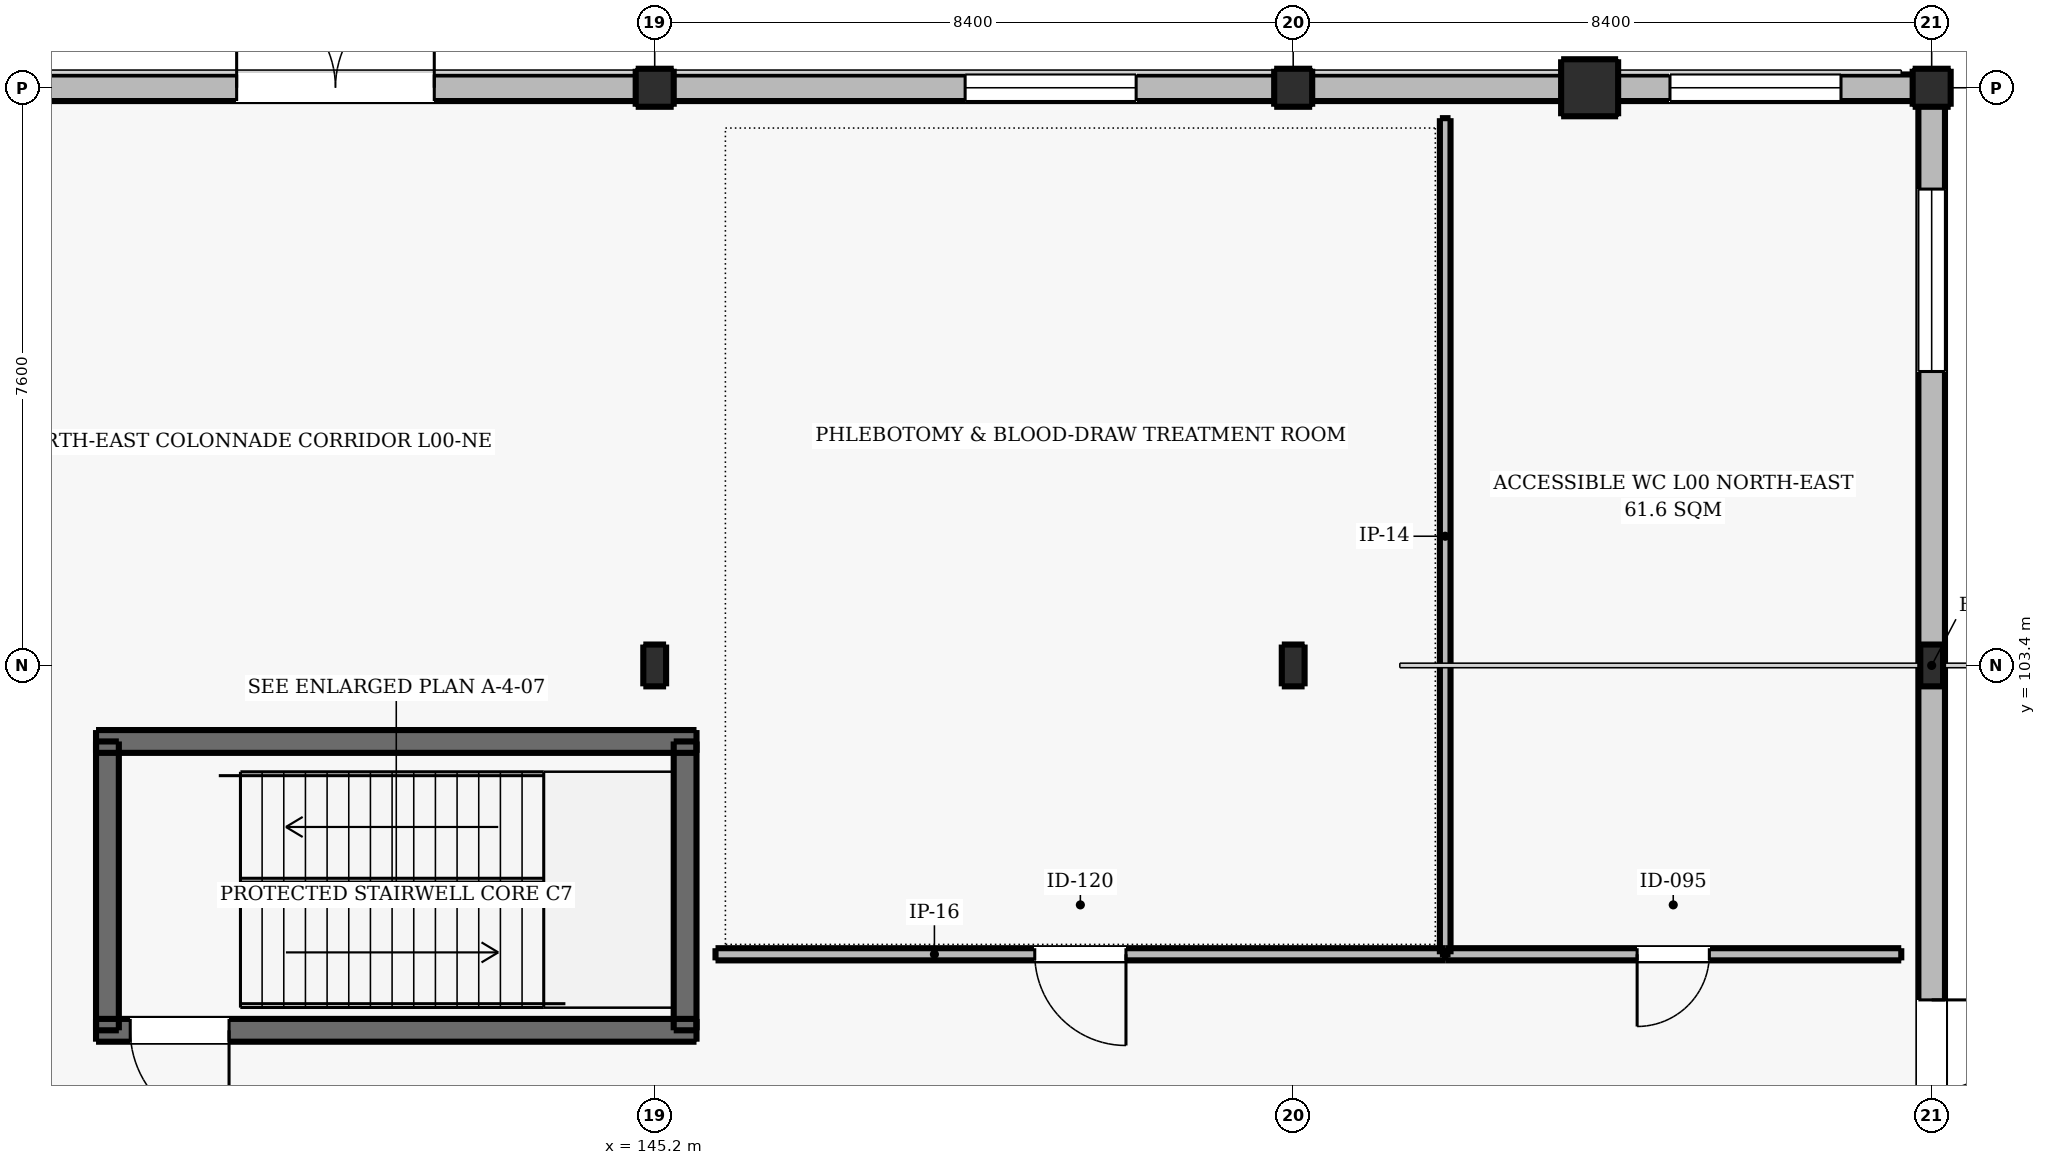
"""IFC4 building model, lengths in metres.
Left out: names, types, materials, properties, quantities, classifications, styles, units other than length and angle.
Written with IfcOpenShell. Run it as: python <this file> out.ifc"""

import sys

from ifc_helpers import new_model, si_unit, direction, frame, frame_2d, origin, origin_2d, place, context, subcontext, project, spatial, rectangle, circle, i_section, extrude, element, fill, save


model = new_model("IFC4")
c1 = context("Model", 3, precision=1e-05, world=origin(), true_north=direction((0.0, 1.0)))
c2 = subcontext(c1, "Body", "Model", "MODEL_VIEW")
j1 = project(units=[si_unit("LENGTHUNIT", "METRE"), si_unit("PLANEANGLEUNIT", "RADIAN")], contexts=[c1])
p1 = place(None, origin())
s1 = spatial("IfcSite", under=j1, at=p1, CompositionType="ELEMENT")
p2 = place(p1, origin())
s2 = spatial("IfcBuilding", under=s1, at=p2, CompositionType="ELEMENT")
p3 = place(p2, origin())
s3 = spatial("IfcBuildingStorey", under=s2, at=p3, CompositionType="ELEMENT", Elevation=0.0)
p4 = place(p3, frame((145.2, 103.4, 0.0), z_axis=(0.0, 0.0, 1.0), x_axis=(1.0, 0.0, 0.0)))
e1 = element("IfcColumn", 1, at=p4, inside=s3, PredefinedType="COLUMN", context=c2, shape_type="SweptSolid", body=[
    extrude(i_section(OverallWidth=0.3, OverallDepth=0.55, WebThickness=0.015, FlangeThickness=0.029, FilletRadius=0.027, at=origin_2d()), origin(), (0.0, 0.0, 1.0), 5.1),
])
p5 = place(p3, frame((145.2, 111.0, 0.0), z_axis=(0.0, 0.0, 1.0), x_axis=(1.0, 0.0, 0.0)))
e2 = element("IfcColumn", 2, at=p5, inside=s3, PredefinedType="COLUMN", context=c2, shape_type="SweptSolid", body=[
    extrude(circle(Radius=0.35, at=origin_2d()), origin(), (0.0, 0.0, 1.0), 5.1),
])
p6 = place(p3, frame((153.6, 103.4, 0.0), z_axis=(0.0, 0.0, 1.0), x_axis=(1.0, 0.0, 0.0)))
e3 = element("IfcColumn", 3, at=p6, inside=s3, PredefinedType="COLUMN", context=c2, shape_type="SweptSolid", body=[
    extrude(i_section(OverallWidth=0.3, OverallDepth=0.55, WebThickness=0.015, FlangeThickness=0.029, FilletRadius=0.027, at=origin_2d()), origin(), (0.0, 0.0, 1.0), 5.1),
])
p7 = place(p3, frame((153.6, 111.0, 0.0), z_axis=(0.0, 0.0, 1.0), x_axis=(1.0, 0.0, 0.0)))
e4 = element("IfcColumn", 4, at=p7, inside=s3, PredefinedType="COLUMN", context=c2, shape_type="SweptSolid", body=[
    extrude(circle(Radius=0.35, at=origin_2d()), origin(), (0.0, 0.0, 1.0), 5.1),
])
p8 = place(p3, frame((157.5, 111.0, 0.0), z_axis=(0.0, 0.0, 1.0), x_axis=(1.0, 0.0, 0.0)))
e5 = element("IfcColumn", 5, at=p8, inside=s3, PredefinedType="PILASTER", context=c2, shape_type="SweptSolid", body=[
    extrude(rectangle(XDim=0.75, YDim=0.75, at=origin_2d()), origin(), (0.0, 0.0, 1.0), 5.1),
])
p9 = place(p3, frame((162.0, 103.4, 0.0), z_axis=(0.0, 0.0, 1.0), x_axis=(1.0, 0.0, 0.0)))
e6 = element("IfcColumn", 6, at=p9, inside=s3, PredefinedType="COLUMN", context=c2, shape_type="SweptSolid", body=[
    extrude(i_section(OverallWidth=0.3, OverallDepth=0.55, WebThickness=0.015, FlangeThickness=0.029, FilletRadius=0.027, at=origin_2d()), origin(), (0.0, 0.0, 1.0), 5.1),
])
p10 = place(p3, frame((162.0, 111.0, 0.0), z_axis=(0.0, 0.0, 1.0), x_axis=(1.0, 0.0, 0.0)))
e7 = element("IfcColumn", 7, at=p10, inside=s3, PredefinedType="COLUMN", context=c2, shape_type="SweptSolid", body=[
    extrude(circle(Radius=0.35, at=origin_2d()), origin(), (0.0, 0.0, 1.0), 5.1),
])
p11 = place(p3, frame((137.85, 98.6, 0.0), z_axis=(0.0, 0.0, 1.0), x_axis=(1.0, 0.0, 0.0)))
e8 = element("IfcWall", 8, at=p11, inside=s3, PredefinedType="SHEAR", context=c2, shape_type="SweptSolid", body=[
    extrude(rectangle(XDim=7.9, YDim=0.3, at=frame_2d((3.95, 0.0))), origin(), (0.0, 0.0, 1.0), 5.1),
])
p12 = place(p11, frame((0.45, 0.0, 0.0)))
e9 = element("IfcOpeningElement", 9, at=p12, cuts=e8, PredefinedType="OPENING", context=c2, shape_type="SweptSolid", body=[
    extrude(rectangle(XDim=1.3, YDim=2.15, at=frame_2d((0.65, 1.075))), frame((0.0, 0.16, 0.0), z_axis=(0.0, -1.0, 0.0), x_axis=(1.0, 0.0, 0.0)), (0.0, 0.0, 1.0), 0.32),
])
p13 = place(p3, frame((137.85, 102.4, 0.0), z_axis=(0.0, 0.0, 1.0), x_axis=(1.0, 0.0, 0.0)))
e10 = element("IfcWall", 10, at=p13, inside=s3, PredefinedType="SHEAR", context=c2, shape_type="SweptSolid", body=[
    extrude(rectangle(XDim=7.9, YDim=0.3, at=frame_2d((3.95, 0.0))), origin(), (0.0, 0.0, 1.0), 5.1),
])
for number, where, z_axis, x_axis in (
    (11, (138.0, 98.6, 0.0), (0.0, 0.0, 1.0), (0.0, 1.0, 0.0)),
    (12, (145.6, 98.6, 0.0), (0.0, 0.0, 1.0), (0.0, 1.0, 0.0)),
):
    element("IfcWall", number, at=place(p3, frame(where, z_axis=z_axis, x_axis=x_axis)), inside=s3, PredefinedType="SHEAR", context=c2, shape_type="SweptSolid", body=[
        extrude(rectangle(XDim=3.8, YDim=0.3, at=frame_2d((1.9, 0.0))), origin(), (0.0, 0.0, 1.0), 5.1),
    ])
p14 = place(p3, frame((111.0, 111.0, 0.0), z_axis=(0.0, 0.0, 1.0), x_axis=(1.0, 0.0, 0.0)))
e13 = element("IfcWall", 13, at=p14, inside=s3, PredefinedType="SOLIDWALL", context=c2, shape_type="SweptSolid", body=[
    extrude(rectangle(XDim=51.0, YDim=0.35, at=frame_2d((25.5, 0.0))), origin(), (0.0, 0.0, 1.0), 4.28),
])
p15 = place(p14, frame((11.9, 0.0, 0.0)))
e14 = element("IfcOpeningElement", 14, at=p15, cuts=e13, PredefinedType="OPENING", context=c2, shape_type="SweptSolid", body=[
    extrude(rectangle(XDim=2.6, YDim=2.6, at=frame_2d((1.3, 1.3))), frame((0.0, 0.185, 0.0), z_axis=(0.0, -1.0, 0.0), x_axis=(1.0, 0.0, 0.0)), (0.0, 0.0, 1.0), 0.37),
])
p16 = place(p14, frame((28.7, 0.0, 0.0)))
e15 = element("IfcOpeningElement", 15, at=p16, cuts=e13, PredefinedType="OPENING", context=c2, shape_type="SweptSolid", body=[
    extrude(rectangle(XDim=2.6, YDim=2.6, at=frame_2d((1.3, 1.3))), frame((0.0, 0.185, 0.0), z_axis=(0.0, -1.0, 0.0), x_axis=(1.0, 0.0, 0.0)), (0.0, 0.0, 1.0), 0.37),
])
p17 = place(p14, frame((1.193, 0.0, 1.05)))
e16 = element("IfcOpeningElement", 16, at=p17, cuts=e13, PredefinedType="OPENING", context=c2, shape_type="SweptSolid", body=[
    extrude(rectangle(XDim=2.25, YDim=1.7, at=frame_2d((1.125, 0.85))), frame((0.0, 0.185, 0.0), z_axis=(0.0, -1.0, 0.0), x_axis=(1.0, 0.0, 0.0)), (0.0, 0.0, 1.0), 0.37),
])
p18 = place(p14, frame((5.83, 0.0, 1.05)))
e17 = element("IfcOpeningElement", 17, at=p18, cuts=e13, PredefinedType="OPENING", context=c2, shape_type="SweptSolid", body=[
    extrude(rectangle(XDim=2.25, YDim=1.7, at=frame_2d((1.125, 0.85))), frame((0.0, 0.185, 0.0), z_axis=(0.0, -1.0, 0.0), x_axis=(1.0, 0.0, 0.0)), (0.0, 0.0, 1.0), 0.37),
])
p19 = place(p14, frame((38.284, 0.0, 1.05)))
e18 = element("IfcOpeningElement", 18, at=p19, cuts=e13, PredefinedType="OPENING", context=c2, shape_type="SweptSolid", body=[
    extrude(rectangle(XDim=2.25, YDim=1.7, at=frame_2d((1.125, 0.85))), frame((0.0, 0.185, 0.0), z_axis=(0.0, -1.0, 0.0), x_axis=(1.0, 0.0, 0.0)), (0.0, 0.0, 1.0), 0.37),
])
p20 = place(p14, frame((47.557, 0.0, 1.05)))
e19 = element("IfcOpeningElement", 19, at=p20, cuts=e13, PredefinedType="OPENING", context=c2, shape_type="SweptSolid", body=[
    extrude(rectangle(XDim=2.25, YDim=1.7, at=frame_2d((1.125, 0.85))), frame((0.0, 0.185, 0.0), z_axis=(0.0, -1.0, 0.0), x_axis=(1.0, 0.0, 0.0)), (0.0, 0.0, 1.0), 0.37),
])
p21 = place(p3, frame((162.0, 111.0, 0.0), z_axis=(0.0, 0.0, 1.0), x_axis=(0.0, -1.0, 0.0)))
e20 = element("IfcWall", 20, at=p21, inside=s3, PredefinedType="SOLIDWALL", context=c2, shape_type="SweptSolid", body=[
    extrude(rectangle(XDim=15.2, YDim=0.35, at=frame_2d((7.6, 0.0))), origin(), (0.0, 0.0, 1.0), 4.36),
])
p22 = place(p21, frame((12.0, 0.0, 0.0)))
e21 = element("IfcOpeningElement", 21, at=p22, cuts=e20, PredefinedType="OPENING", context=c2, shape_type="SweptSolid", body=[
    extrude(rectangle(XDim=2.4, YDim=2.5, at=frame_2d((1.2, 1.25))), frame((0.0, 0.185, 0.0), z_axis=(0.0, -1.0, 0.0), x_axis=(1.0, 0.0, 0.0)), (0.0, 0.0, 1.0), 0.37),
])
p23 = place(p21, frame((1.333, 0.0, 1.05)))
e22 = element("IfcOpeningElement", 22, at=p23, cuts=e20, PredefinedType="OPENING", context=c2, shape_type="SweptSolid", body=[
    extrude(rectangle(XDim=2.4, YDim=1.75, at=frame_2d((1.2, 0.875))), frame((0.0, 0.185, 0.0), z_axis=(0.0, -1.0, 0.0), x_axis=(1.0, 0.0, 0.0)), (0.0, 0.0, 1.0), 0.37),
])
p24 = place(p3, frame((146.0, 99.6, 0.0), z_axis=(0.0, 0.0, 1.0), x_axis=(1.0, 0.0, 0.0)))
e23 = element("IfcWall", 23, at=p24, inside=s3, PredefinedType="PARTITIONING", context=c2, shape_type="SweptSolid", body=[
    extrude(rectangle(XDim=9.6, YDim=0.16, at=frame_2d((4.8, 0.0))), origin(), (0.0, 0.0, 1.0), 4.82),
])
p25 = place(p24, frame((4.2, 0.0, 0.0)))
e24 = element("IfcOpeningElement", 24, at=p25, cuts=e23, PredefinedType="OPENING", context=c2, shape_type="SweptSolid", body=[
    extrude(rectangle(XDim=1.2, YDim=2.2, at=frame_2d((0.6, 1.1))), frame((0.0, 0.09, 0.0), z_axis=(0.0, -1.0, 0.0), x_axis=(1.0, 0.0, 0.0)), (0.0, 0.0, 1.0), 0.18),
])
p26 = place(p3, frame((155.6, 99.6, 0.0), z_axis=(0.0, 0.0, 1.0), x_axis=(0.0, 1.0, 0.0)))
e25 = element("IfcWall", 25, at=p26, inside=s3, PredefinedType="PARTITIONING", context=c2, shape_type="SweptSolid", body=[
    extrude(rectangle(XDim=11.0, YDim=0.14, at=frame_2d((5.5, 0.0))), origin(), (0.0, 0.0, 1.0), 4.82),
])
p27 = place(p3, frame((155.6, 99.6, 0.0), z_axis=(0.0, 0.0, 1.0), x_axis=(1.0, 0.0, 0.0)))
e26 = element("IfcWall", 26, at=p27, inside=s3, PredefinedType="PARTITIONING", context=c2, shape_type="SweptSolid", body=[
    extrude(rectangle(XDim=6.0, YDim=0.16, at=frame_2d((3.0, 0.0))), origin(), (0.0, 0.0, 1.0), 4.82),
])
p28 = place(p27, frame((2.525, 0.0, 0.0)))
e27 = element("IfcOpeningElement", 27, at=p28, cuts=e26, PredefinedType="OPENING", context=c2, shape_type="SweptSolid", body=[
    extrude(rectangle(XDim=0.95, YDim=2.1, at=frame_2d((0.475, 1.05))), frame((0.0, 0.09, 0.0), z_axis=(0.0, -1.0, 0.0), x_axis=(1.0, 0.0, 0.0)), (0.0, 0.0, 1.0), 0.18),
])
p29 = place(p16, origin())
e28 = element("IfcDoor", 28, at=p29, inside=s3, OperationType="DOUBLE_DOOR_SINGLE_SWING", PredefinedType="DOOR", context=c2, shape_type="SweptSolid", body=[
    extrude(rectangle(XDim=2.6, YDim=2.6, at=frame_2d((1.3, 1.3))), frame((0.0, 0.025, 0.0), z_axis=(0.0, -1.0, 0.0), x_axis=(1.0, 0.0, 0.0)), (0.0, 0.0, 1.0), 0.05),
])
fill(e15, e28)
p30 = place(p22, origin())
e29 = element("IfcDoor", 29, at=p30, inside=s3, OperationType="DOUBLE_DOOR_SINGLE_SWING", PredefinedType="DOOR", context=c2, shape_type="SweptSolid", body=[
    extrude(rectangle(XDim=2.4, YDim=2.5, at=frame_2d((1.2, 1.25))), frame((0.0, 0.025, 0.0), z_axis=(0.0, -1.0, 0.0), x_axis=(1.0, 0.0, 0.0)), (0.0, 0.0, 1.0), 0.05),
])
fill(e21, e29)
p31 = place(p19, origin())
e30 = element("IfcWindow", 30, at=p31, inside=s3, PartitioningType="SINGLE_PANEL", PredefinedType="WINDOW", context=c2, shape_type="SweptSolid", body=[
    extrude(rectangle(XDim=2.25, YDim=1.7, at=frame_2d((1.125, 0.85))), frame((0.0, 0.03, 0.0), z_axis=(0.0, -1.0, 0.0), x_axis=(1.0, 0.0, 0.0)), (0.0, 0.0, 1.0), 0.06),
])
fill(e18, e30)
p32 = place(p20, origin())
e31 = element("IfcWindow", 31, at=p32, inside=s3, PartitioningType="SINGLE_PANEL", PredefinedType="WINDOW", context=c2, shape_type="SweptSolid", body=[
    extrude(rectangle(XDim=2.25, YDim=1.7, at=frame_2d((1.125, 0.85))), frame((0.0, 0.03, 0.0), z_axis=(0.0, -1.0, 0.0), x_axis=(1.0, 0.0, 0.0)), (0.0, 0.0, 1.0), 0.06),
])
fill(e19, e31)
p33 = place(p23, origin())
e32 = element("IfcWindow", 32, at=p33, inside=s3, PartitioningType="SINGLE_PANEL", PredefinedType="WINDOW", context=c2, shape_type="SweptSolid", body=[
    extrude(rectangle(XDim=2.4, YDim=1.75, at=frame_2d((1.2, 0.875))), frame((0.0, 0.03, 0.0), z_axis=(0.0, -1.0, 0.0), x_axis=(1.0, 0.0, 0.0)), (0.0, 0.0, 1.0), 0.06),
])
fill(e22, e32)
p34 = place(p12, frame((1.3, 0.0, 0.0), z_axis=(0.0, 0.0, 1.0), x_axis=(-1.0, 0.0, 0.0)))
e33 = element("IfcDoor", 33, at=p34, inside=s3, OperationType="SINGLE_SWING_RIGHT", PredefinedType="DOOR", context=c2, shape_type="SweptSolid", body=[
    extrude(rectangle(XDim=1.3, YDim=2.15, at=frame_2d((0.65, 1.075))), frame((0.0, 0.025, 0.0), z_axis=(0.0, -1.0, 0.0), x_axis=(1.0, 0.0, 0.0)), (0.0, 0.0, 1.0), 0.05),
])
fill(e9, e33)
p35 = place(p25, frame((1.2, 0.0, 0.0), z_axis=(0.0, 0.0, 1.0), x_axis=(-1.0, 0.0, 0.0)))
e34 = element("IfcDoor", 34, at=p35, inside=s3, OperationType="SINGLE_SWING_RIGHT", PredefinedType="DOOR", context=c2, shape_type="SweptSolid", body=[
    extrude(rectangle(XDim=1.2, YDim=2.2, at=frame_2d((0.6, 1.1))), frame((0.0, 0.025, 0.0), z_axis=(0.0, -1.0, 0.0), x_axis=(1.0, 0.0, 0.0)), (0.0, 0.0, 1.0), 0.05),
])
fill(e24, e34)
p36 = place(p28, frame((0.95, 0.0, 0.0), z_axis=(0.0, 0.0, 1.0), x_axis=(-1.0, 0.0, 0.0)))
e35 = element("IfcDoor", 35, at=p36, inside=s3, OperationType="SINGLE_SWING_LEFT", PredefinedType="DOOR", context=c2, shape_type="SweptSolid", body=[
    extrude(rectangle(XDim=0.95, YDim=2.1, at=frame_2d((0.475, 1.05))), frame((0.0, 0.025, 0.0), z_axis=(0.0, -1.0, 0.0), x_axis=(1.0, 0.0, 0.0)), (0.0, 0.0, 1.0), 0.05),
])
fill(e27, e35)
save(model, sys.argv[1])
